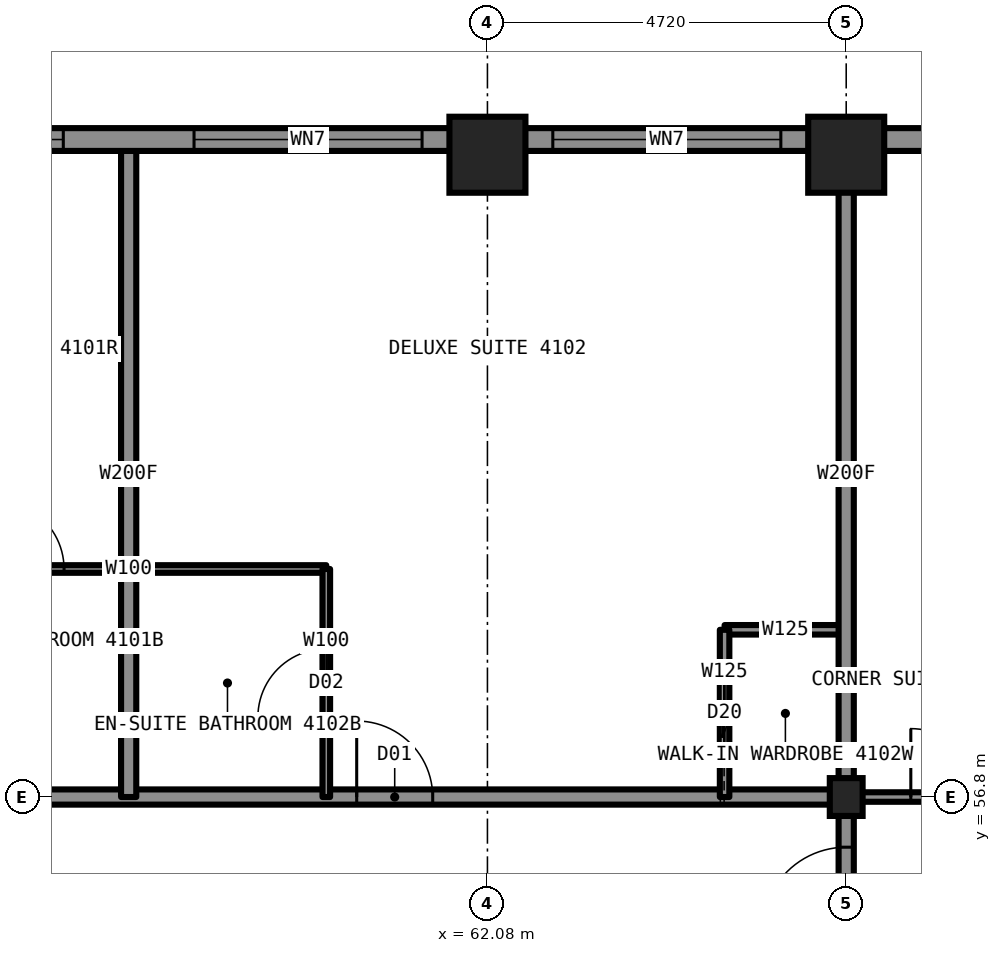
"""IFC4 building model, lengths in metres.
Left out: names, types, materials, properties, quantities, classifications, styles, units other than length and angle.
Written with IfcOpenShell. Run it as: python <this file> out.ifc"""

import sys

from ifc_helpers import new_model, si_unit, direction, frame, frame_2d, origin, origin_2d, place, context, subcontext, project, spatial, rectangle, i_section, extrude, element, fill, save


model = new_model("IFC4")
c1 = context("Model", 3, precision=1e-05, world=origin(), true_north=direction((0.0, 1.0)))
c2 = subcontext(c1, "Body", "Model", "MODEL_VIEW")
j1 = project(units=[si_unit("LENGTHUNIT", "METRE"), si_unit("PLANEANGLEUNIT", "RADIAN")], contexts=[c1])
p1 = place(None, origin())
s1 = spatial("IfcSite", under=j1, at=p1, CompositionType="ELEMENT")
p2 = place(p1, origin())
s2 = spatial("IfcBuilding", under=s1, at=p2, CompositionType="ELEMENT")
p3 = place(p2, frame((0.0, 0.0, 145.9)))
s3 = spatial("IfcBuildingStorey", under=s2, at=p3, CompositionType="ELEMENT", Elevation=145.9)
for number, where, z_axis, x_axis in (
    (1, (62.08, 65.25, 0.0), (0.0, 0.0, 1.0), (1.0, 0.0, 0.0)),
    (2, (66.8, 65.25, 0.0), (0.0, 0.0, 1.0), (1.0, 0.0, 0.0)),
):
    element("IfcColumn", number, at=place(p3, frame(where, z_axis=z_axis, x_axis=x_axis)), inside=s3, PredefinedType="COLUMN", context=c2, shape_type="SweptSolid", body=[
        extrude(i_section(OverallWidth=0.422, OverallDepth=0.465, WebThickness=0.045, FlangeThickness=0.073, at=origin_2d()), origin(), (0.0, 0.0, 1.0), 3.5),
    ])
p4 = place(p3, frame((66.8, 56.8, 0.0), z_axis=(0.0, 0.0, 1.0), x_axis=(1.0, 0.0, 0.0)))
e3 = element("IfcColumn", 3, at=p4, inside=s3, PredefinedType="COLUMN", context=c2, shape_type="SweptSolid", body=[
    extrude(i_section(OverallWidth=0.432, OverallDepth=0.498, WebThickness=0.056, FlangeThickness=0.089, at=origin_2d()), origin(), (0.0, 0.0, 1.0), 3.5),
])
p5 = place(p3, frame((43.2, 56.8, 0.0), z_axis=(0.0, 0.0, 1.0), x_axis=(1.0, 0.0, 0.0)))
e4 = element("IfcWall", 4, at=p5, inside=s3, PredefinedType="PARTITIONING", context=c2, shape_type="SweptSolid", body=[
    extrude(rectangle(XDim=23.6, YDim=0.2, at=frame_2d((11.8, 0.0))), origin(), (0.0, 0.0, 1.0), 3.33),
])
p6 = place(p5, frame((1.85, 0.0, 0.0)))
e5 = element("IfcOpeningElement", 5, at=p6, cuts=e4, PredefinedType="OPENING", context=c2, shape_type="SweptSolid", body=[
    extrude(rectangle(XDim=1.1, YDim=2.2, at=frame_2d((0.55, 1.1))), frame((0.0, 0.11, 0.0), z_axis=(0.0, -1.0, 0.0), x_axis=(1.0, 0.0, 0.0)), (0.0, 0.0, 1.0), 0.22),
])
p7 = place(p5, frame((17.16, 0.0, 0.0)))
e6 = element("IfcOpeningElement", 6, at=p7, cuts=e4, PredefinedType="OPENING", context=c2, shape_type="SweptSolid", body=[
    extrude(rectangle(XDim=1.0, YDim=2.2, at=frame_2d((0.5, 1.1))), frame((0.0, 0.11, 0.0), z_axis=(0.0, -1.0, 0.0), x_axis=(1.0, 0.0, 0.0)), (0.0, 0.0, 1.0), 0.22),
])
p8 = place(p3, frame((66.8, 56.8, 0.0), z_axis=(0.0, 0.0, 1.0), x_axis=(1.0, 0.0, 0.0)))
e7 = element("IfcWall", 7, at=p8, inside=s3, PredefinedType="PARTITIONING", context=c2, shape_type="SweptSolid", body=[
    extrude(rectangle(XDim=8.5, YDim=0.125, at=frame_2d((4.25, 0.0))), origin(), (0.0, 0.0, 1.0), 2.573),
])
p9 = place(p8, frame((0.85, 0.0, 0.0)))
e8 = element("IfcOpeningElement", 8, at=p9, cuts=e7, PredefinedType="OPENING", context=c2, shape_type="SweptSolid", body=[
    extrude(rectangle(XDim=0.9, YDim=2.2, at=frame_2d((0.45, 1.1))), frame((0.0, 0.073, 0.0), z_axis=(0.0, -1.0, 0.0), x_axis=(1.0, 0.0, 0.0)), (0.0, 0.0, 1.0), 0.145),
])
p10 = place(p3, frame((65.2, 59.0, 0.0), z_axis=(0.0, 0.0, 1.0), x_axis=(1.0, 0.0, 0.0)))
e9 = element("IfcWall", 9, at=p10, inside=s3, PredefinedType="PARTITIONING", context=c2, shape_type="SweptSolid", body=[
    extrude(rectangle(XDim=1.6, YDim=0.125, at=frame_2d((0.8, 0.0))), origin(), (0.0, 0.0, 1.0), 3.33),
])
p11 = place(p3, frame((54.76, 59.8, 0.0), z_axis=(0.0, 0.0, 1.0), x_axis=(1.0, 0.0, 0.0)))
e10 = element("IfcWall", 10, at=p11, inside=s3, PredefinedType="PARTITIONING", context=c2, shape_type="SweptSolid", body=[
    extrude(rectangle(XDim=5.2, YDim=0.1, at=frame_2d((2.6, 0.0))), origin(), (0.0, 0.0, 1.0), 3.33),
])
p12 = place(p11, frame((0.85, 0.0, 0.0)))
e11 = element("IfcOpeningElement", 11, at=p12, cuts=e10, PredefinedType="OPENING", context=c2, shape_type="SweptSolid", body=[
    extrude(rectangle(XDim=0.9, YDim=2.1, at=frame_2d((0.45, 1.05))), frame((0.0, 0.06, 0.0), z_axis=(0.0, -1.0, 0.0), x_axis=(1.0, 0.0, 0.0)), (0.0, 0.0, 1.0), 0.12),
])
p13 = place(p3, frame((65.2, 56.8, 0.0), z_axis=(0.0, 0.0, 1.0), x_axis=(0.0, 1.0, 0.0)))
e12 = element("IfcWall", 12, at=p13, inside=s3, PredefinedType="PARTITIONING", context=c2, shape_type="SweptSolid", body=[
    extrude(rectangle(XDim=2.2, YDim=0.125, at=frame_2d((1.1, 0.0))), origin(), (0.0, 0.0, 1.0), 3.33),
])
p14 = place(p13, frame((0.7, 0.0, 0.0)))
e13 = element("IfcOpeningElement", 13, at=p14, cuts=e12, PredefinedType="OPENING", context=c2, shape_type="SweptSolid", body=[
    extrude(rectangle(XDim=0.8, YDim=2.1, at=frame_2d((0.4, 1.05))), frame((0.0, 0.073, 0.0), z_axis=(0.0, -1.0, 0.0), x_axis=(1.0, 0.0, 0.0)), (0.0, 0.0, 1.0), 0.145),
])
p15 = place(p3, frame((66.8, 33.2, 0.0), z_axis=(0.0, 0.0, 1.0), x_axis=(0.0, 1.0, 0.0)))
e14 = element("IfcWall", 14, at=p15, inside=s3, PredefinedType="PARTITIONING", context=c2, shape_type="SweptSolid", body=[
    extrude(rectangle(XDim=23.6, YDim=0.2, at=frame_2d((11.8, 0.0))), origin(), (0.0, 0.0, 1.0), 3.33),
])
p16 = place(p15, frame((7.87, 0.0, 0.0)))
e15 = element("IfcOpeningElement", 15, at=p16, cuts=e14, PredefinedType="OPENING", context=c2, shape_type="SweptSolid", body=[
    extrude(rectangle(XDim=1.0, YDim=2.2, at=frame_2d((0.5, 1.1))), frame((0.0, 0.11, 0.0), z_axis=(0.0, -1.0, 0.0), x_axis=(1.0, 0.0, 0.0)), (0.0, 0.0, 1.0), 0.22),
])
p17 = place(p15, frame((11.7, 0.0, 0.0)))
e16 = element("IfcOpeningElement", 16, at=p17, cuts=e14, PredefinedType="OPENING", context=c2, shape_type="SweptSolid", body=[
    extrude(rectangle(XDim=1.0, YDim=2.2, at=frame_2d((0.5, 1.1))), frame((0.0, 0.11, 0.0), z_axis=(0.0, -1.0, 0.0), x_axis=(1.0, 0.0, 0.0)), (0.0, 0.0, 1.0), 0.22),
])
p18 = place(p15, frame((14.56, 0.0, 0.0)))
e17 = element("IfcOpeningElement", 17, at=p18, cuts=e14, PredefinedType="OPENING", context=c2, shape_type="SweptSolid", body=[
    extrude(rectangle(XDim=1.0, YDim=2.2, at=frame_2d((0.5, 1.1))), frame((0.0, 0.11, 0.0), z_axis=(0.0, -1.0, 0.0), x_axis=(1.0, 0.0, 0.0)), (0.0, 0.0, 1.0), 0.22),
])
p19 = place(p15, frame((21.84, 0.0, 0.0)))
e18 = element("IfcOpeningElement", 18, at=p19, cuts=e14, PredefinedType="OPENING", context=c2, shape_type="SweptSolid", body=[
    extrude(rectangle(XDim=1.1, YDim=2.2, at=frame_2d((0.55, 1.1))), frame((0.0, 0.11, 0.0), z_axis=(0.0, -1.0, 0.0), x_axis=(1.0, 0.0, 0.0)), (0.0, 0.0, 1.0), 0.22),
])
p20 = place(p15, frame((0.66, 0.0, 0.0)))
e19 = element("IfcOpeningElement", 19, at=p20, cuts=e14, PredefinedType="OPENING", context=c2, shape_type="SweptSolid", body=[
    extrude(rectangle(XDim=1.1, YDim=2.2, at=frame_2d((0.55, 1.1))), frame((0.0, 0.11, 0.0), z_axis=(0.0, -1.0, 0.0), x_axis=(1.0, 0.0, 0.0)), (0.0, 0.0, 1.0), 0.22),
])
p21 = place(p3, frame((66.8, 56.8, 0.0), z_axis=(0.0, 0.0, 1.0), x_axis=(0.0, 1.0, 0.0)))
e20 = element("IfcWall", 20, at=p21, inside=s3, PredefinedType="PARTITIONING", context=c2, shape_type="SweptSolid", body=[
    extrude(rectangle(XDim=8.5, YDim=0.2, at=frame_2d((4.25, 0.0))), origin(), (0.0, 0.0, 1.0), 2.573),
])
p22 = place(p3, frame((57.36, 56.8, 0.0), z_axis=(0.0, 0.0, 1.0), x_axis=(0.0, 1.0, 0.0)))
e21 = element("IfcWall", 21, at=p22, inside=s3, PredefinedType="PARTITIONING", context=c2, shape_type="SweptSolid", body=[
    extrude(rectangle(XDim=8.5, YDim=0.2, at=frame_2d((4.25, 0.0))), origin(), (0.0, 0.0, 1.0), 3.33),
])
p23 = place(p3, frame((59.96, 56.8, 0.0), z_axis=(0.0, 0.0, 1.0), x_axis=(0.0, 1.0, 0.0)))
e22 = element("IfcWall", 22, at=p23, inside=s3, PredefinedType="PARTITIONING", context=c2, shape_type="SweptSolid", body=[
    extrude(rectangle(XDim=3.0, YDim=0.1, at=frame_2d((1.5, 0.0))), origin(), (0.0, 0.0, 1.0), 3.33),
])
p24 = place(p23, frame((1.05, 0.0, 0.0)))
e23 = element("IfcOpeningElement", 23, at=p24, cuts=e22, PredefinedType="OPENING", context=c2, shape_type="SweptSolid", body=[
    extrude(rectangle(XDim=0.9, YDim=2.1, at=frame_2d((0.45, 1.05))), frame((0.0, 0.06, 0.0), z_axis=(0.0, -1.0, 0.0), x_axis=(1.0, 0.0, 0.0)), (0.0, 0.0, 1.0), 0.12),
])
p25 = place(p3, frame((70.1, 65.45, 0.0), z_axis=(0.0, 0.0, 1.0), x_axis=(-1.0, 0.0, 0.0)))
e24 = element("IfcWall", 24, at=p25, inside=s3, PredefinedType="SOLIDWALL", context=c2, shape_type="SweptSolid", body=[
    extrude(rectangle(XDim=30.2, YDim=0.3, at=frame_2d((15.1, 0.0))), origin(), (0.0, 0.0, 1.0), 2.83),
])
p26 = place(p25, frame((1.3, 0.0, 0.8)))
e25 = element("IfcOpeningElement", 25, at=p26, cuts=e24, PredefinedType="OPENING", context=c2, shape_type="SweptSolid", body=[
    extrude(rectangle(XDim=1.1, YDim=1.7, at=frame_2d((0.55, 0.85))), frame((0.0, 0.16, 0.0), z_axis=(0.0, -1.0, 0.0), x_axis=(1.0, 0.0, 0.0)), (0.0, 0.0, 1.0), 0.32),
])
p27 = place(p25, frame((4.16, 0.0, 0.5)))
e26 = element("IfcOpeningElement", 26, at=p27, cuts=e24, PredefinedType="OPENING", context=c2, shape_type="SweptSolid", body=[
    extrude(rectangle(XDim=3.0, YDim=2.0, at=frame_2d((1.5, 1.0))), frame((0.0, 0.16, 0.0), z_axis=(0.0, -1.0, 0.0), x_axis=(1.0, 0.0, 0.0)), (0.0, 0.0, 1.0), 0.32),
])
p28 = place(p25, frame((8.88, 0.0, 0.5)))
e27 = element("IfcOpeningElement", 27, at=p28, cuts=e24, PredefinedType="OPENING", context=c2, shape_type="SweptSolid", body=[
    extrude(rectangle(XDim=3.0, YDim=2.0, at=frame_2d((1.5, 1.0))), frame((0.0, 0.16, 0.0), z_axis=(0.0, -1.0, 0.0), x_axis=(1.0, 0.0, 0.0)), (0.0, 0.0, 1.0), 0.32),
])
p29 = place(p25, frame((13.6, 0.0, 0.5)))
e28 = element("IfcOpeningElement", 28, at=p29, cuts=e24, PredefinedType="OPENING", context=c2, shape_type="SweptSolid", body=[
    extrude(rectangle(XDim=3.0, YDim=2.0, at=frame_2d((1.5, 1.0))), frame((0.0, 0.16, 0.0), z_axis=(0.0, -1.0, 0.0), x_axis=(1.0, 0.0, 0.0)), (0.0, 0.0, 1.0), 0.32),
])
p30 = place(p25, frame((18.32, 0.0, 0.5)))
e29 = element("IfcOpeningElement", 29, at=p30, cuts=e24, PredefinedType="OPENING", context=c2, shape_type="SweptSolid", body=[
    extrude(rectangle(XDim=3.0, YDim=2.0, at=frame_2d((1.5, 1.0))), frame((0.0, 0.16, 0.0), z_axis=(0.0, -1.0, 0.0), x_axis=(1.0, 0.0, 0.0)), (0.0, 0.0, 1.0), 0.32),
])
p31 = place(p25, frame((23.04, 0.0, 0.5)))
e30 = element("IfcOpeningElement", 30, at=p31, cuts=e24, PredefinedType="OPENING", context=c2, shape_type="SweptSolid", body=[
    extrude(rectangle(XDim=3.0, YDim=2.0, at=frame_2d((1.5, 1.0))), frame((0.0, 0.16, 0.0), z_axis=(0.0, -1.0, 0.0), x_axis=(1.0, 0.0, 0.0)), (0.0, 0.0, 1.0), 0.32),
])
p32 = place(p25, frame((27.75, 0.0, 0.8)))
e31 = element("IfcOpeningElement", 31, at=p32, cuts=e24, PredefinedType="OPENING", context=c2, shape_type="SweptSolid", body=[
    extrude(rectangle(XDim=1.1, YDim=1.7, at=frame_2d((0.55, 0.85))), frame((0.0, 0.16, 0.0), z_axis=(0.0, -1.0, 0.0), x_axis=(1.0, 0.0, 0.0)), (0.0, 0.0, 1.0), 0.32),
])
p33 = place(p12, origin())
e32 = element("IfcDoor", 32, at=p33, inside=s3, OperationType="SINGLE_SWING_RIGHT", PredefinedType="DOOR", context=c2, shape_type="SweptSolid", body=[
    extrude(rectangle(XDim=0.9, YDim=2.1, at=frame_2d((0.45, 1.05))), frame((0.0, 0.025, 0.0), z_axis=(0.0, -1.0, 0.0), x_axis=(1.0, 0.0, 0.0)), (0.0, 0.0, 1.0), 0.05),
])
fill(e11, e32)
p34 = place(p7, origin())
e33 = element("IfcDoor", 33, at=p34, inside=s3, OperationType="SINGLE_SWING_LEFT", PredefinedType="DOOR", context=c2, shape_type="SweptSolid", body=[
    extrude(rectangle(XDim=1.0, YDim=2.2, at=frame_2d((0.5, 1.1))), frame((0.0, 0.025, 0.0), z_axis=(0.0, -1.0, 0.0), x_axis=(1.0, 0.0, 0.0)), (0.0, 0.0, 1.0), 0.05),
])
fill(e6, e33)
p35 = place(p24, origin())
e34 = element("IfcDoor", 34, at=p35, inside=s3, OperationType="SINGLE_SWING_RIGHT", PredefinedType="DOOR", context=c2, shape_type="SweptSolid", body=[
    extrude(rectangle(XDim=0.9, YDim=2.1, at=frame_2d((0.45, 1.05))), frame((0.0, 0.025, 0.0), z_axis=(0.0, -1.0, 0.0), x_axis=(1.0, 0.0, 0.0)), (0.0, 0.0, 1.0), 0.05),
])
fill(e23, e34)
p36 = place(p14, origin())
e35 = element("IfcDoor", 35, at=p36, inside=s3, OperationType="SLIDING_TO_LEFT", PredefinedType="DOOR", context=c2, shape_type="SweptSolid", body=[
    extrude(rectangle(XDim=0.8, YDim=2.1, at=frame_2d((0.4, 1.05))), frame((0.0, 0.025, 0.0), z_axis=(0.0, -1.0, 0.0), x_axis=(1.0, 0.0, 0.0)), (0.0, 0.0, 1.0), 0.05),
])
fill(e13, e35)
p37 = place(p9, origin())
e36 = element("IfcDoor", 36, at=p37, inside=s3, OperationType="SINGLE_SWING_LEFT", PredefinedType="DOOR", context=c2, shape_type="SweptSolid", body=[
    extrude(rectangle(XDim=0.9, YDim=2.2, at=frame_2d((0.45, 1.1))), frame((0.0, 0.025, 0.0), z_axis=(0.0, -1.0, 0.0), x_axis=(1.0, 0.0, 0.0)), (0.0, 0.0, 1.0), 0.05),
])
fill(e8, e36)
p38 = place(p19, origin())
e37 = element("IfcDoor", 37, at=p38, inside=s3, OperationType="SINGLE_SWING_LEFT", PredefinedType="DOOR", context=c2, shape_type="SweptSolid", body=[
    extrude(rectangle(XDim=1.1, YDim=2.2, at=frame_2d((0.55, 1.1))), frame((0.0, 0.025, 0.0), z_axis=(0.0, -1.0, 0.0), x_axis=(1.0, 0.0, 0.0)), (0.0, 0.0, 1.0), 0.05),
])
fill(e18, e37)
p39 = place(p26, origin())
e38 = element("IfcWindow", 38, at=p39, inside=s3, PartitioningType="SINGLE_PANEL", PredefinedType="WINDOW", context=c2, shape_type="SweptSolid", body=[
    extrude(rectangle(XDim=1.1, YDim=1.7, at=frame_2d((0.55, 0.85))), frame((0.0, 0.03, 0.0), z_axis=(0.0, -1.0, 0.0), x_axis=(1.0, 0.0, 0.0)), (0.0, 0.0, 1.0), 0.06),
])
fill(e25, e38)
p40 = place(p27, origin())
e39 = element("IfcWindow", 39, at=p40, inside=s3, PartitioningType="SINGLE_PANEL", PredefinedType="WINDOW", context=c2, shape_type="SweptSolid", body=[
    extrude(rectangle(XDim=3.0, YDim=2.0, at=frame_2d((1.5, 1.0))), frame((0.0, 0.03, 0.0), z_axis=(0.0, -1.0, 0.0), x_axis=(1.0, 0.0, 0.0)), (0.0, 0.0, 1.0), 0.06),
])
fill(e26, e39)
p41 = place(p28, origin())
e40 = element("IfcWindow", 40, at=p41, inside=s3, PartitioningType="SINGLE_PANEL", PredefinedType="WINDOW", context=c2, shape_type="SweptSolid", body=[
    extrude(rectangle(XDim=3.0, YDim=2.0, at=frame_2d((1.5, 1.0))), frame((0.0, 0.03, 0.0), z_axis=(0.0, -1.0, 0.0), x_axis=(1.0, 0.0, 0.0)), (0.0, 0.0, 1.0), 0.06),
])
fill(e27, e40)
p42 = place(p29, origin())
e41 = element("IfcWindow", 41, at=p42, inside=s3, PartitioningType="SINGLE_PANEL", PredefinedType="WINDOW", context=c2, shape_type="SweptSolid", body=[
    extrude(rectangle(XDim=3.0, YDim=2.0, at=frame_2d((1.5, 1.0))), frame((0.0, 0.03, 0.0), z_axis=(0.0, -1.0, 0.0), x_axis=(1.0, 0.0, 0.0)), (0.0, 0.0, 1.0), 0.06),
])
fill(e28, e41)
save(model, sys.argv[1])
